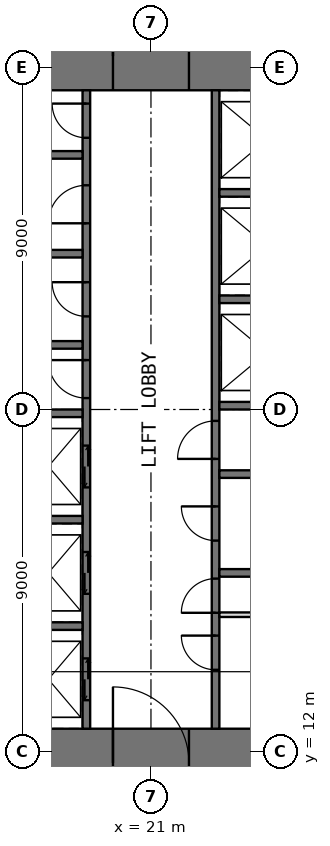
"""IFC4 building model, lengths in metres.
Left out: names, types, materials, properties, quantities, classifications, styles, units other than length and angle.
Written with IfcOpenShell. Run it as: python <this file> out.ifc"""

import sys

from ifc_helpers import new_model, si_unit, direction, frame, frame_2d, origin, place, context, subcontext, project, spatial, rectangle, extrude, element, fill, save


model = new_model("IFC4")
c1 = context("Model", 3, precision=1e-05, world=origin(), true_north=direction((0.0, 1.0)))
c2 = subcontext(c1, "Body", "Model", "MODEL_VIEW")
j1 = project(units=[si_unit("LENGTHUNIT", "METRE"), si_unit("PLANEANGLEUNIT", "RADIAN")], contexts=[c1])
p1 = place(None, origin())
s1 = spatial("IfcSite", under=j1, at=p1, CompositionType="ELEMENT")
p2 = place(p1, origin())
s2 = spatial("IfcBuilding", under=s1, at=p2, CompositionType="ELEMENT")
p3 = place(p2, frame((0.0, 0.0, 22.5)))
s3 = spatial("IfcBuildingStorey", under=s2, at=p3, CompositionType="ELEMENT", Elevation=22.5)
p4 = place(p3, frame((10.8, 11.7, -0.05), z_axis=(0.0, 0.0, 1.0), x_axis=(1.0, 0.0, 0.0)))
e1 = element("IfcWall", 1, at=p4, inside=s3, PredefinedType="SHEAR", context=c2, shape_type="SweptSolid", body=[
    extrude(rectangle(XDim=20.4, YDim=1.8, at=frame_2d((10.2, 0.0))), origin(), (0.0, 0.0, 1.0), 4.0),
])
p5 = place(p4, frame((9.2, 0.0, 0.05)))
e2 = element("IfcOpeningElement", 2, at=p5, cuts=e1, PredefinedType="OPENING", context=c2, shape_type="SweptSolid", body=[
    extrude(rectangle(XDim=2.0, YDim=2.2, at=frame_2d((1.0, 1.1))), frame((0.0, 0.91, 0.0), z_axis=(0.0, -1.0, 0.0), x_axis=(1.0, 0.0, 0.0)), (0.0, 0.0, 1.0), 1.82),
])
p6 = place(p3, frame((10.8, 30.3, -0.05), z_axis=(0.0, 0.0, 1.0), x_axis=(1.0, 0.0, 0.0)))
e3 = element("IfcWall", 3, at=p6, inside=s3, PredefinedType="SHEAR", context=c2, shape_type="SweptSolid", body=[
    extrude(rectangle(XDim=20.4, YDim=1.8, at=frame_2d((10.2, 0.0))), origin(), (0.0, 0.0, 1.0), 4.0),
])
p7 = place(p6, frame((9.2, 0.0, 0.05)))
e4 = element("IfcOpeningElement", 4, at=p7, cuts=e3, PredefinedType="OPENING", context=c2, shape_type="SweptSolid", body=[
    extrude(rectangle(XDim=2.0, YDim=2.2, at=frame_2d((1.0, 1.1))), frame((0.0, 0.91, 0.0), z_axis=(0.0, -1.0, 0.0), x_axis=(1.0, 0.0, 0.0)), (0.0, 0.0, 1.0), 1.82),
])
p8 = place(p3, frame((19.3, 12.6, -0.05), z_axis=(0.0, 0.0, 1.0), x_axis=(0.0, 1.0, 0.0)))
e5 = element("IfcWall", 5, at=p8, inside=s3, PredefinedType="SHEAR", context=c2, shape_type="SweptSolid", body=[
    extrude(rectangle(XDim=16.8, YDim=0.2, at=frame_2d((8.4, 0.0))), origin(), (0.0, 0.0, 1.0), 4.0),
])
p9 = place(p8, frame((8.7, 0.0, 0.05)))
e6 = element("IfcOpeningElement", 6, at=p9, cuts=e5, PredefinedType="OPENING", context=c2, shape_type="SweptSolid", body=[
    extrude(rectangle(XDim=1.0, YDim=2.2, at=frame_2d((0.5, 1.1))), frame((0.0, 0.11, 0.0), z_axis=(0.0, -1.0, 0.0), x_axis=(1.0, 0.0, 0.0)), (0.0, 0.0, 1.0), 0.22),
])
p10 = place(p8, frame((10.85, 0.0, 0.05)))
e7 = element("IfcOpeningElement", 7, at=p10, cuts=e5, PredefinedType="OPENING", context=c2, shape_type="SweptSolid", body=[
    extrude(rectangle(XDim=0.9, YDim=2.2, at=frame_2d((0.45, 1.1))), frame((0.0, 0.11, 0.0), z_axis=(0.0, -1.0, 0.0), x_axis=(1.0, 0.0, 0.0)), (0.0, 0.0, 1.0), 0.22),
])
p11 = place(p8, frame((13.3, 0.0, 0.05)))
e8 = element("IfcOpeningElement", 8, at=p11, cuts=e5, PredefinedType="OPENING", context=c2, shape_type="SweptSolid", body=[
    extrude(rectangle(XDim=1.0, YDim=2.2, at=frame_2d((0.5, 1.1))), frame((0.0, 0.11, 0.0), z_axis=(0.0, -1.0, 0.0), x_axis=(1.0, 0.0, 0.0)), (0.0, 0.0, 1.0), 0.22),
])
p12 = place(p8, frame((15.55, 0.0, 0.05)))
e9 = element("IfcOpeningElement", 9, at=p12, cuts=e5, PredefinedType="OPENING", context=c2, shape_type="SweptSolid", body=[
    extrude(rectangle(XDim=0.9, YDim=2.2, at=frame_2d((0.45, 1.1))), frame((0.0, 0.11, 0.0), z_axis=(0.0, -1.0, 0.0), x_axis=(1.0, 0.0, 0.0)), (0.0, 0.0, 1.0), 0.22),
])
p13 = place(p8, frame((0.75, 0.0, 0.05)))
e10 = element("IfcOpeningElement", 10, at=p13, cuts=e5, PredefinedType="OPENING", context=c2, shape_type="SweptSolid", body=[
    extrude(rectangle(XDim=1.1, YDim=2.2, at=frame_2d((0.55, 1.1))), frame((0.0, 0.11, 0.0), z_axis=(0.0, -1.0, 0.0), x_axis=(1.0, 0.0, 0.0)), (0.0, 0.0, 1.0), 0.22),
])
p14 = place(p8, frame((3.55, 0.0, 0.05)))
e11 = element("IfcOpeningElement", 11, at=p14, cuts=e5, PredefinedType="OPENING", context=c2, shape_type="SweptSolid", body=[
    extrude(rectangle(XDim=1.1, YDim=2.2, at=frame_2d((0.55, 1.1))), frame((0.0, 0.11, 0.0), z_axis=(0.0, -1.0, 0.0), x_axis=(1.0, 0.0, 0.0)), (0.0, 0.0, 1.0), 0.22),
])
p15 = place(p8, frame((6.35, 0.0, 0.05)))
e12 = element("IfcOpeningElement", 12, at=p15, cuts=e5, PredefinedType="OPENING", context=c2, shape_type="SweptSolid", body=[
    extrude(rectangle(XDim=1.1, YDim=2.2, at=frame_2d((0.55, 1.1))), frame((0.0, 0.11, 0.0), z_axis=(0.0, -1.0, 0.0), x_axis=(1.0, 0.0, 0.0)), (0.0, 0.0, 1.0), 0.22),
])
p16 = place(p3, frame((22.7, 12.6, -0.05), z_axis=(0.0, 0.0, 1.0), x_axis=(0.0, 1.0, 0.0)))
e13 = element("IfcWall", 13, at=p16, inside=s3, PredefinedType="SHEAR", context=c2, shape_type="SweptSolid", body=[
    extrude(rectangle(XDim=16.8, YDim=0.2, at=frame_2d((8.4, 0.0))), origin(), (0.0, 0.0, 1.0), 4.0),
])
p17 = place(p16, frame((3.05, 0.0, 0.05)))
e14 = element("IfcOpeningElement", 14, at=p17, cuts=e13, PredefinedType="OPENING", context=c2, shape_type="SweptSolid", body=[
    extrude(rectangle(XDim=0.9, YDim=2.2, at=frame_2d((0.45, 1.1))), frame((0.0, 0.11, 0.0), z_axis=(0.0, -1.0, 0.0), x_axis=(1.0, 0.0, 0.0)), (0.0, 0.0, 1.0), 0.22),
])
p18 = place(p16, frame((7.1, 0.0, 0.05)))
e15 = element("IfcOpeningElement", 15, at=p18, cuts=e13, PredefinedType="OPENING", context=c2, shape_type="SweptSolid", body=[
    extrude(rectangle(XDim=1.0, YDim=2.2, at=frame_2d((0.5, 1.1))), frame((0.0, 0.11, 0.0), z_axis=(0.0, -1.0, 0.0), x_axis=(1.0, 0.0, 0.0)), (0.0, 0.0, 1.0), 0.22),
])
p19 = place(p16, frame((1.55, 0.0, 0.05)))
e16 = element("IfcOpeningElement", 16, at=p19, cuts=e13, PredefinedType="OPENING", context=c2, shape_type="SweptSolid", body=[
    extrude(rectangle(XDim=0.9, YDim=2.2, at=frame_2d((0.45, 1.1))), frame((0.0, 0.11, 0.0), z_axis=(0.0, -1.0, 0.0), x_axis=(1.0, 0.0, 0.0)), (0.0, 0.0, 1.0), 0.22),
])
p20 = place(p16, frame((4.95, 0.0, 0.05)))
e17 = element("IfcOpeningElement", 17, at=p20, cuts=e13, PredefinedType="OPENING", context=c2, shape_type="SweptSolid", body=[
    extrude(rectangle(XDim=0.9, YDim=2.2, at=frame_2d((0.45, 1.1))), frame((0.0, 0.11, 0.0), z_axis=(0.0, -1.0, 0.0), x_axis=(1.0, 0.0, 0.0)), (0.0, 0.0, 1.0), 0.22),
])
for number, where, z_axis, x_axis in (
    (18, (16.0, 15.3, -0.05), (0.0, 0.0, 1.0), (1.0, 0.0, 0.0)),
    (19, (16.0, 18.1, -0.05), (0.0, 0.0, 1.0), (1.0, 0.0, 0.0)),
    (20, (16.0, 20.9, -0.05), (0.0, 0.0, 1.0), (1.0, 0.0, 0.0)),
    (21, (16.0, 22.7, -0.05), (0.0, 0.0, 1.0), (1.0, 0.0, 0.0)),
    (22, (16.0, 25.1, -0.05), (0.0, 0.0, 1.0), (1.0, 0.0, 0.0)),
    (23, (16.0, 27.7, -0.05), (0.0, 0.0, 1.0), (1.0, 0.0, 0.0)),
    (24, (22.8, 16.7, -0.05), (0.0, 0.0, 1.0), (1.0, 0.0, 0.0)),
    (25, (22.8, 19.3, -0.05), (0.0, 0.0, 1.0), (1.0, 0.0, 0.0)),
    (26, (22.8, 21.1, -0.05), (0.0, 0.0, 1.0), (1.0, 0.0, 0.0)),
    (27, (22.8, 23.9, -0.05), (0.0, 0.0, 1.0), (1.0, 0.0, 0.0)),
    (28, (22.8, 26.7, -0.05), (0.0, 0.0, 1.0), (1.0, 0.0, 0.0)),
):
    element("IfcWall", number, at=place(p3, frame(where, z_axis=z_axis, x_axis=x_axis)), inside=s3, PredefinedType="SHEAR", context=c2, shape_type="SweptSolid", body=[
        extrude(rectangle(XDim=3.2, YDim=0.2, at=frame_2d((1.6, 0.0))), origin(), (0.0, 0.0, 1.0), 4.0),
    ])
p21 = place(p3, frame((22.8, 15.6, 0.0), z_axis=(0.0, 0.0, 1.0), x_axis=(1.0, 0.0, 0.0)))
e29 = element("IfcWall", 29, at=p21, inside=s3, PredefinedType="PARTITIONING", context=c2, shape_type="SweptSolid", body=[
    extrude(rectangle(XDim=3.2, YDim=0.12, at=frame_2d((1.6, 0.0))), origin(), (0.0, 0.0, 1.0), 3.75),
])
p22 = place(p5, origin())
e30 = element("IfcDoor", 30, at=p22, inside=s3, OperationType="DOUBLE_DOOR_SINGLE_SWING", PredefinedType="DOOR", context=c2, shape_type="SweptSolid", body=[
    extrude(rectangle(XDim=2.0, YDim=2.2, at=frame_2d((1.0, 1.1))), frame((0.0, 0.025, 0.0), z_axis=(0.0, -1.0, 0.0), x_axis=(1.0, 0.0, 0.0)), (0.0, 0.0, 1.0), 0.05),
])
fill(e2, e30)
p23 = place(p7, origin())
e31 = element("IfcDoor", 31, at=p23, inside=s3, OperationType="DOUBLE_DOOR_SINGLE_SWING", PredefinedType="DOOR", context=c2, shape_type="SweptSolid", body=[
    extrude(rectangle(XDim=2.0, YDim=2.2, at=frame_2d((1.0, 1.1))), frame((0.0, 0.025, 0.0), z_axis=(0.0, -1.0, 0.0), x_axis=(1.0, 0.0, 0.0)), (0.0, 0.0, 1.0), 0.05),
])
fill(e4, e31)
p24 = place(p17, origin())
e32 = element("IfcDoor", 32, at=p24, inside=s3, OperationType="SINGLE_SWING_LEFT", PredefinedType="DOOR", context=c2, shape_type="SweptSolid", body=[
    extrude(rectangle(XDim=0.9, YDim=2.2, at=frame_2d((0.45, 1.1))), frame((0.0, 0.025, 0.0), z_axis=(0.0, -1.0, 0.0), x_axis=(1.0, 0.0, 0.0)), (0.0, 0.0, 1.0), 0.05),
])
fill(e14, e32)
p25 = place(p9, origin())
e33 = element("IfcDoor", 33, at=p25, inside=s3, OperationType="SINGLE_SWING_RIGHT", PredefinedType="DOOR", context=c2, shape_type="SweptSolid", body=[
    extrude(rectangle(XDim=1.0, YDim=2.2, at=frame_2d((0.5, 1.1))), frame((0.0, 0.025, 0.0), z_axis=(0.0, -1.0, 0.0), x_axis=(1.0, 0.0, 0.0)), (0.0, 0.0, 1.0), 0.05),
])
fill(e6, e33)
p26 = place(p18, origin())
e34 = element("IfcDoor", 34, at=p26, inside=s3, OperationType="SINGLE_SWING_LEFT", PredefinedType="DOOR", context=c2, shape_type="SweptSolid", body=[
    extrude(rectangle(XDim=1.0, YDim=2.2, at=frame_2d((0.5, 1.1))), frame((0.0, 0.025, 0.0), z_axis=(0.0, -1.0, 0.0), x_axis=(1.0, 0.0, 0.0)), (0.0, 0.0, 1.0), 0.05),
])
fill(e15, e34)
p27 = place(p10, origin())
e35 = element("IfcDoor", 35, at=p27, inside=s3, OperationType="SINGLE_SWING_RIGHT", PredefinedType="DOOR", context=c2, shape_type="SweptSolid", body=[
    extrude(rectangle(XDim=0.9, YDim=2.2, at=frame_2d((0.45, 1.1))), frame((0.0, 0.025, 0.0), z_axis=(0.0, -1.0, 0.0), x_axis=(1.0, 0.0, 0.0)), (0.0, 0.0, 1.0), 0.05),
])
fill(e7, e35)
p28 = place(p11, origin())
e36 = element("IfcDoor", 36, at=p28, inside=s3, OperationType="SINGLE_SWING_LEFT", PredefinedType="DOOR", context=c2, shape_type="SweptSolid", body=[
    extrude(rectangle(XDim=1.0, YDim=2.2, at=frame_2d((0.5, 1.1))), frame((0.0, 0.025, 0.0), z_axis=(0.0, -1.0, 0.0), x_axis=(1.0, 0.0, 0.0)), (0.0, 0.0, 1.0), 0.05),
])
fill(e8, e36)
p29 = place(p12, origin())
e37 = element("IfcDoor", 37, at=p29, inside=s3, OperationType="SINGLE_SWING_RIGHT", PredefinedType="DOOR", context=c2, shape_type="SweptSolid", body=[
    extrude(rectangle(XDim=0.9, YDim=2.2, at=frame_2d((0.45, 1.1))), frame((0.0, 0.025, 0.0), z_axis=(0.0, -1.0, 0.0), x_axis=(1.0, 0.0, 0.0)), (0.0, 0.0, 1.0), 0.05),
])
fill(e9, e37)
p30 = place(p19, origin())
e38 = element("IfcDoor", 38, at=p30, inside=s3, OperationType="SINGLE_SWING_RIGHT", PredefinedType="DOOR", context=c2, shape_type="SweptSolid", body=[
    extrude(rectangle(XDim=0.9, YDim=2.2, at=frame_2d((0.45, 1.1))), frame((0.0, 0.025, 0.0), z_axis=(0.0, -1.0, 0.0), x_axis=(1.0, 0.0, 0.0)), (0.0, 0.0, 1.0), 0.05),
])
fill(e16, e38)
p31 = place(p20, origin())
e39 = element("IfcDoor", 39, at=p31, inside=s3, OperationType="SINGLE_SWING_RIGHT", PredefinedType="DOOR", context=c2, shape_type="SweptSolid", body=[
    extrude(rectangle(XDim=0.9, YDim=2.2, at=frame_2d((0.45, 1.1))), frame((0.0, 0.025, 0.0), z_axis=(0.0, -1.0, 0.0), x_axis=(1.0, 0.0, 0.0)), (0.0, 0.0, 1.0), 0.05),
])
fill(e17, e39)
p32 = place(p13, origin())
e40 = element("IfcDoor", 40, at=p32, inside=s3, OperationType="DOUBLE_DOOR_SLIDING", PredefinedType="DOOR", context=c2, shape_type="SweptSolid", body=[
    extrude(rectangle(XDim=1.1, YDim=2.2, at=frame_2d((0.55, 1.1))), frame((0.0, 0.025, 0.0), z_axis=(0.0, -1.0, 0.0), x_axis=(1.0, 0.0, 0.0)), (0.0, 0.0, 1.0), 0.05),
])
fill(e10, e40)
p33 = place(p14, origin())
e41 = element("IfcDoor", 41, at=p33, inside=s3, OperationType="DOUBLE_DOOR_SLIDING", PredefinedType="DOOR", context=c2, shape_type="SweptSolid", body=[
    extrude(rectangle(XDim=1.1, YDim=2.2, at=frame_2d((0.55, 1.1))), frame((0.0, 0.025, 0.0), z_axis=(0.0, -1.0, 0.0), x_axis=(1.0, 0.0, 0.0)), (0.0, 0.0, 1.0), 0.05),
])
fill(e11, e41)
p34 = place(p15, origin())
e42 = element("IfcDoor", 42, at=p34, inside=s3, OperationType="DOUBLE_DOOR_SLIDING", PredefinedType="DOOR", context=c2, shape_type="SweptSolid", body=[
    extrude(rectangle(XDim=1.1, YDim=2.2, at=frame_2d((0.55, 1.1))), frame((0.0, 0.025, 0.0), z_axis=(0.0, -1.0, 0.0), x_axis=(1.0, 0.0, 0.0)), (0.0, 0.0, 1.0), 0.05),
])
fill(e12, e42)
save(model, sys.argv[1])
